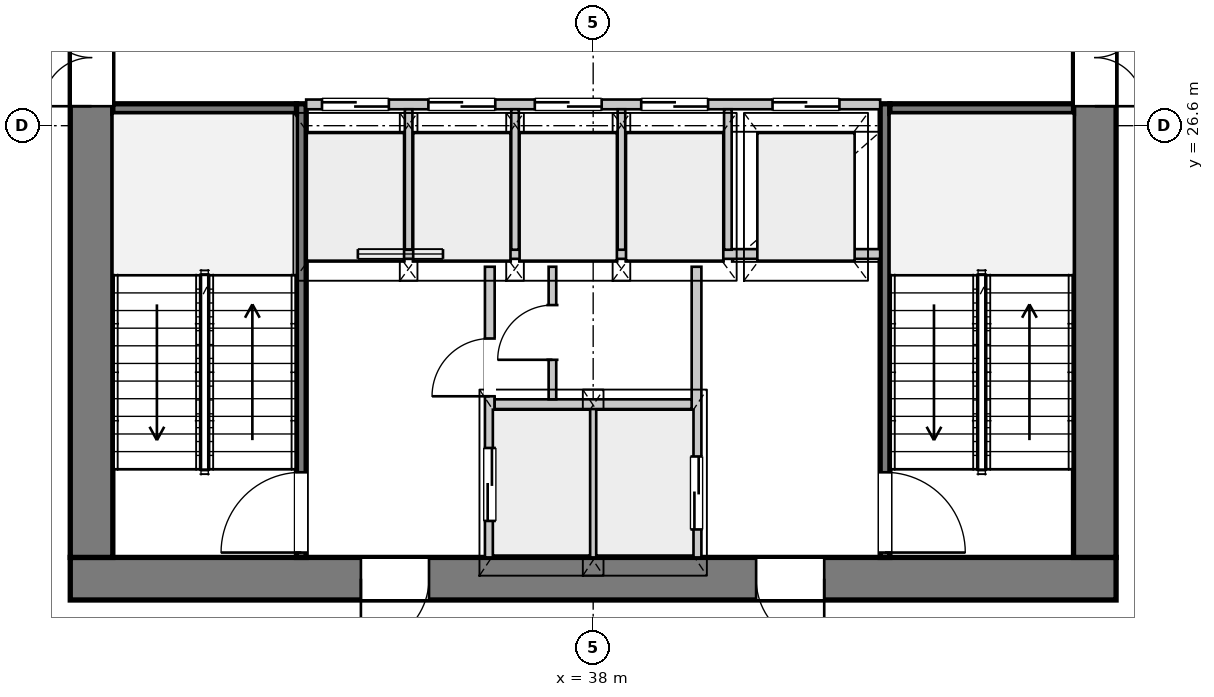
"""IFC4 building model, lengths in metres.
Left out: names, types, materials, properties, quantities, classifications, styles, units other than length and angle.
Written with IfcOpenShell. Run it as: python <this file> out.ifc"""

import sys

from ifc_helpers import new_model, si_unit, direction, frame, frame_2d, origin, place, context, subcontext, project, spatial, rectangle, extrude, source, transform, mapped, element, fill, save


model = new_model("IFC4")
c1 = context("Model", 3, precision=1e-05, world=origin(), true_north=direction((0.0, 1.0)))
c2 = subcontext(c1, "Body", "Model", "MODEL_VIEW")
j1 = project(units=[si_unit("LENGTHUNIT", "METRE"), si_unit("PLANEANGLEUNIT", "RADIAN")], contexts=[c1])
p1 = place(None, origin())
s1 = spatial("IfcSite", under=j1, at=p1, CompositionType="ELEMENT")
p2 = place(p1, origin())
s2 = spatial("IfcBuilding", under=s1, at=p2, CompositionType="ELEMENT")
p3 = place(p2, frame((0.0, 0.0, 134.1)))
s3 = spatial("IfcBuildingStorey", under=s2, at=p3, CompositionType="ELEMENT", Elevation=134.1)
p4 = place(p3, frame((46.6, 19.15, 0.0), z_axis=(0.0, 0.0, 1.0), x_axis=(-1.0, 0.0, 0.0)))
e1 = element("IfcWall", 1, at=p4, inside=s3, PredefinedType="SHEAR", context=c2, shape_type="SweptSolid", body=[
    extrude(rectangle(XDim=17.2, YDim=0.7, at=frame_2d((8.6, 0.0))), origin(), (0.0, 0.0, 1.0), 3.75),
])
p5 = place(p4, frame((4.8, 0.0, 0.0)))
e2 = element("IfcOpeningElement", 2, at=p5, cuts=e1, PredefinedType="OPENING", context=c2, shape_type="SweptSolid", body=[
    extrude(rectangle(XDim=1.12, YDim=2.25, at=frame_2d((0.56, 1.125))), frame((0.0, 0.36, 0.0), z_axis=(0.0, -1.0, 0.0), x_axis=(1.0, 0.0, 0.0)), (0.0, 0.0, 1.0), 0.72),
])
p6 = place(p4, frame((11.3, 0.0, 0.0)))
e3 = element("IfcOpeningElement", 3, at=p6, cuts=e1, PredefinedType="OPENING", context=c2, shape_type="SweptSolid", body=[
    extrude(rectangle(XDim=1.12, YDim=2.25, at=frame_2d((0.56, 1.125))), frame((0.0, 0.36, 0.0), z_axis=(0.0, -1.0, 0.0), x_axis=(1.0, 0.0, 0.0)), (0.0, 0.0, 1.0), 0.72),
])
p7 = place(p3, frame((29.75, 19.5, 0.0), z_axis=(0.0, 0.0, 1.0), x_axis=(0.0, 1.0, 0.0)))
e4 = element("IfcWall", 4, at=p7, inside=s3, PredefinedType="SHEAR", context=c2, shape_type="SweptSolid", body=[
    extrude(rectangle(XDim=14.2, YDim=0.7, at=frame_2d((7.1, 0.0))), origin(), (0.0, 0.0, 1.0), 3.75),
])
p8 = place(p7, frame((7.42, 0.0, 0.0)))
e5 = element("IfcOpeningElement", 5, at=p8, cuts=e4, PredefinedType="OPENING", context=c2, shape_type="SweptSolid", body=[
    extrude(rectangle(XDim=1.6, YDim=2.2, at=frame_2d((0.8, 1.1))), frame((0.0, 0.36, 0.0), z_axis=(0.0, -1.0, 0.0), x_axis=(1.0, 0.0, 0.0)), (0.0, 0.0, 1.0), 0.72),
])
p9 = place(p3, frame((46.25, 33.7, 0.0), z_axis=(0.0, 0.0, 1.0), x_axis=(0.0, -1.0, 0.0)))
e6 = element("IfcWall", 6, at=p9, inside=s3, PredefinedType="SHEAR", context=c2, shape_type="SweptSolid", body=[
    extrude(rectangle(XDim=14.2, YDim=0.7, at=frame_2d((7.1, 0.0))), origin(), (0.0, 0.0, 1.0), 3.75),
])
p10 = place(p9, frame((5.18, 0.0, 0.0)))
e7 = element("IfcOpeningElement", 7, at=p10, cuts=e6, PredefinedType="OPENING", context=c2, shape_type="SweptSolid", body=[
    extrude(rectangle(XDim=1.6, YDim=2.2, at=frame_2d((0.8, 1.1))), frame((0.0, 0.36, 0.0), z_axis=(0.0, -1.0, 0.0), x_axis=(1.0, 0.0, 0.0)), (0.0, 0.0, 1.0), 0.72),
])
p11 = place(p3, frame((33.2, 19.5, 0.0), z_axis=(0.0, 0.0, 1.0), x_axis=(0.0, 1.0, 0.0)))
e8 = element("IfcWall", 8, at=p11, inside=s3, PredefinedType="PARTITIONING", context=c2, shape_type="SweptSolid", body=[
    extrude(rectangle(XDim=7.46, YDim=0.16, at=frame_2d((3.73, 0.0))), origin(), (0.0, 0.0, 1.0), 3.75),
])
p12 = place(p11, frame((0.08, 0.0, 0.0)))
e9 = element("IfcOpeningElement", 9, at=p12, cuts=e8, PredefinedType="OPENING", context=c2, shape_type="SweptSolid", body=[
    extrude(rectangle(XDim=1.32, YDim=2.2, at=frame_2d((0.66, 1.1))), frame((0.0, 0.09, 0.0), z_axis=(0.0, -1.0, 0.0), x_axis=(1.0, 0.0, 0.0)), (0.0, 0.0, 1.0), 0.18),
])
p13 = place(p3, frame((30.1, 26.88, 0.0), z_axis=(0.0, 0.0, 1.0), x_axis=(1.0, 0.0, 0.0)))
e10 = element("IfcWall", 10, at=p13, inside=s3, PredefinedType="PARTITIONING", context=c2, shape_type="SweptSolid", body=[
    extrude(rectangle(XDim=3.02, YDim=0.16, at=frame_2d((1.51, 0.0))), origin(), (0.0, 0.0, 1.0), 3.75),
])
p14 = place(p3, frame((42.8, 26.96, 0.0), z_axis=(0.0, 0.0, 1.0), x_axis=(0.0, -1.0, 0.0)))
e11 = element("IfcWall", 11, at=p14, inside=s3, PredefinedType="PARTITIONING", context=c2, shape_type="SweptSolid", body=[
    extrude(rectangle(XDim=7.46, YDim=0.16, at=frame_2d((3.73, 0.0))), origin(), (0.0, 0.0, 1.0), 3.75),
])
p15 = place(p14, frame((6.06, 0.0, 0.0)))
e12 = element("IfcOpeningElement", 12, at=p15, cuts=e11, PredefinedType="OPENING", context=c2, shape_type="SweptSolid", body=[
    extrude(rectangle(XDim=1.32, YDim=2.2, at=frame_2d((0.66, 1.1))), frame((0.0, 0.09, 0.0), z_axis=(0.0, -1.0, 0.0), x_axis=(1.0, 0.0, 0.0)), (0.0, 0.0, 1.0), 0.18),
])
p16 = place(p3, frame((42.88, 26.88, 0.0), z_axis=(0.0, 0.0, 1.0), x_axis=(1.0, 0.0, 0.0)))
e13 = element("IfcWall", 13, at=p16, inside=s3, PredefinedType="PARTITIONING", context=c2, shape_type="SweptSolid", body=[
    extrude(rectangle(XDim=3.02, YDim=0.16, at=frame_2d((1.51, 0.0))), origin(), (0.0, 0.0, 1.0), 3.75),
])
p17 = place(p3, frame((36.3, 19.5, 0.0), z_axis=(0.0, 0.0, 1.0), x_axis=(0.0, 1.0, 0.0)))
e14 = element("IfcWall", 14, at=p17, inside=s3, PredefinedType="PARTITIONING", context=c2, shape_type="SweptSolid", body=[
    extrude(rectangle(XDim=4.78, YDim=0.16, at=frame_2d((2.39, 0.0))), origin(), (0.0, 0.0, 1.0), 3.75),
])
p18 = place(p17, frame((0.6, 0.0, 0.0)))
e15 = element("IfcOpeningElement", 15, at=p18, cuts=e14, PredefinedType="OPENING", context=c2, shape_type="SweptSolid", body=[
    extrude(rectangle(XDim=1.2, YDim=2.2, at=frame_2d((0.6, 1.1))), frame((0.0, 0.09, 0.0), z_axis=(0.0, -1.0, 0.0), x_axis=(1.0, 0.0, 0.0)), (0.0, 0.0, 1.0), 0.18),
])
p19 = place(p17, frame((2.65, 0.0, 0.0)))
e16 = element("IfcOpeningElement", 16, at=p19, cuts=e14, PredefinedType="OPENING", context=c2, shape_type="SweptSolid", body=[
    extrude(rectangle(XDim=0.95, YDim=2.1, at=frame_2d((0.475, 1.05))), frame((0.0, 0.09, 0.0), z_axis=(0.0, -1.0, 0.0), x_axis=(1.0, 0.0, 0.0)), (0.0, 0.0, 1.0), 0.18),
])
p20 = place(p3, frame((39.7, 24.28, 0.0), z_axis=(0.0, 0.0, 1.0), x_axis=(0.0, -1.0, 0.0)))
e17 = element("IfcWall", 17, at=p20, inside=s3, PredefinedType="PARTITIONING", context=c2, shape_type="SweptSolid", body=[
    extrude(rectangle(XDim=4.78, YDim=0.16, at=frame_2d((2.39, 0.0))), origin(), (0.0, 0.0, 1.0), 3.75),
])
p21 = place(p20, frame((3.12, 0.0, 0.0)))
e18 = element("IfcOpeningElement", 18, at=p21, cuts=e17, PredefinedType="OPENING", context=c2, shape_type="SweptSolid", body=[
    extrude(rectangle(XDim=1.2, YDim=2.2, at=frame_2d((0.6, 1.1))), frame((0.0, 0.09, 0.0), z_axis=(0.0, -1.0, 0.0), x_axis=(1.0, 0.0, 0.0)), (0.0, 0.0, 1.0), 0.18),
])
p22 = place(p3, frame((38.0, 19.5, 0.0), z_axis=(0.0, 0.0, 1.0), x_axis=(0.0, 1.0, 0.0)))
e19 = element("IfcWall", 19, at=p22, inside=s3, PredefinedType="PARTITIONING", context=c2, shape_type="SweptSolid", body=[
    extrude(rectangle(XDim=2.46, YDim=0.125, at=frame_2d((1.23, 0.0))), origin(), (0.0, 0.0, 1.0), 3.75),
])
p23 = place(p3, frame((36.38, 22.02, 0.0), z_axis=(0.0, 0.0, 1.0), x_axis=(1.0, 0.0, 0.0)))
e20 = element("IfcWall", 20, at=p23, inside=s3, PredefinedType="PARTITIONING", context=c2, shape_type="SweptSolid", body=[
    extrude(rectangle(XDim=3.24, YDim=0.16, at=frame_2d((1.62, 0.0))), origin(), (0.0, 0.0, 1.0), 3.75),
])
p24 = place(p3, frame((33.28, 24.49, 0.0), z_axis=(0.0, 0.0, 1.0), x_axis=(1.0, 0.0, 0.0)))
e21 = element("IfcWall", 21, at=p24, inside=s3, PredefinedType="PARTITIONING", context=c2, shape_type="SweptSolid", body=[
    extrude(rectangle(XDim=9.44, YDim=0.16, at=frame_2d((4.72, 0.0))), origin(), (0.0, 0.0, 1.0), 3.75),
])
p25 = place(p24, frame((0.85, 0.0, 0.95)))
e22 = element("IfcOpeningElement", 22, at=p25, cuts=e21, PredefinedType="OPENING", context=c2, shape_type="SweptSolid", body=[
    extrude(rectangle(XDim=1.4, YDim=1.8, at=frame_2d((0.7, 0.9))), frame((0.0, 0.09, 0.0), z_axis=(0.0, -1.0, 0.0), x_axis=(1.0, 0.0, 0.0)), (0.0, 0.0, 1.0), 0.18),
])
p26 = place(p3, frame((37.33, 22.1, 0.0), z_axis=(0.0, 0.0, 1.0), x_axis=(0.0, 1.0, 0.0)))
e23 = element("IfcWall", 23, at=p26, inside=s3, PredefinedType="PARTITIONING", context=c2, shape_type="SweptSolid", body=[
    extrude(rectangle(XDim=2.18, YDim=0.125, at=frame_2d((1.09, 0.0))), origin(), (0.0, 0.0, 1.0), 3.75),
])
p27 = place(p26, frame((0.65, 0.0, 0.0)))
e24 = element("IfcOpeningElement", 24, at=p27, cuts=e23, PredefinedType="OPENING", context=c2, shape_type="SweptSolid", body=[
    extrude(rectangle(XDim=0.9, YDim=2.1, at=frame_2d((0.45, 1.05))), frame((0.0, 0.073, 0.0), z_axis=(0.0, -1.0, 0.0), x_axis=(1.0, 0.0, 0.0)), (0.0, 0.0, 1.0), 0.145),
])
p28 = place(p3, frame((33.28, 26.95, 0.0), z_axis=(0.0, 0.0, 1.0), x_axis=(1.0, 0.0, 0.0)))
e25 = element("IfcWall", 25, at=p28, inside=s3, PredefinedType="PARTITIONING", context=c2, shape_type="SweptSolid", body=[
    extrude(rectangle(XDim=9.44, YDim=0.16, at=frame_2d((4.72, 0.0))), origin(), (0.0, 0.0, 1.0), 3.75),
])
p29 = place(p28, frame((0.26, 0.0, 0.0)))
e26 = element("IfcOpeningElement", 26, at=p29, cuts=e25, PredefinedType="OPENING", context=c2, shape_type="SweptSolid", body=[
    extrude(rectangle(XDim=1.1, YDim=2.2, at=frame_2d((0.55, 1.1))), frame((0.0, 0.09, 0.0), z_axis=(0.0, -1.0, 0.0), x_axis=(1.0, 0.0, 0.0)), (0.0, 0.0, 1.0), 0.18),
])
p30 = place(p28, frame((2.01, 0.0, 0.0)))
e27 = element("IfcOpeningElement", 27, at=p30, cuts=e25, PredefinedType="OPENING", context=c2, shape_type="SweptSolid", body=[
    extrude(rectangle(XDim=1.1, YDim=2.2, at=frame_2d((0.55, 1.1))), frame((0.0, 0.09, 0.0), z_axis=(0.0, -1.0, 0.0), x_axis=(1.0, 0.0, 0.0)), (0.0, 0.0, 1.0), 0.18),
])
p31 = place(p28, frame((3.76, 0.0, 0.0)))
e28 = element("IfcOpeningElement", 28, at=p31, cuts=e25, PredefinedType="OPENING", context=c2, shape_type="SweptSolid", body=[
    extrude(rectangle(XDim=1.1, YDim=2.2, at=frame_2d((0.55, 1.1))), frame((0.0, 0.09, 0.0), z_axis=(0.0, -1.0, 0.0), x_axis=(1.0, 0.0, 0.0)), (0.0, 0.0, 1.0), 0.18),
])
p32 = place(p28, frame((5.51, 0.0, 0.0)))
e29 = element("IfcOpeningElement", 29, at=p32, cuts=e25, PredefinedType="OPENING", context=c2, shape_type="SweptSolid", body=[
    extrude(rectangle(XDim=1.1, YDim=2.2, at=frame_2d((0.55, 1.1))), frame((0.0, 0.09, 0.0), z_axis=(0.0, -1.0, 0.0), x_axis=(1.0, 0.0, 0.0)), (0.0, 0.0, 1.0), 0.18),
])
p33 = place(p28, frame((7.67, 0.0, 0.0)))
e30 = element("IfcOpeningElement", 30, at=p33, cuts=e25, PredefinedType="OPENING", context=c2, shape_type="SweptSolid", body=[
    extrude(rectangle(XDim=1.1, YDim=2.2, at=frame_2d((0.55, 1.1))), frame((0.0, 0.09, 0.0), z_axis=(0.0, -1.0, 0.0), x_axis=(1.0, 0.0, 0.0)), (0.0, 0.0, 1.0), 0.18),
])
for number, where, z_axis, x_axis in (
    (31, (34.965, 24.56, 0.0), (0.0, 0.0, 1.0), (0.0, 1.0, 0.0)),
    (32, (36.715, 24.56, 0.0), (0.0, 0.0, 1.0), (0.0, 1.0, 0.0)),
    (33, (38.465, 24.56, 0.0), (0.0, 0.0, 1.0), (0.0, 1.0, 0.0)),
    (34, (40.215, 24.56, 0.0), (0.0, 0.0, 1.0), (0.0, 1.0, 0.0)),
):
    element("IfcWall", number, at=place(p3, frame(where, z_axis=z_axis, x_axis=x_axis)), inside=s3, PredefinedType="PARTITIONING", context=c2, shape_type="SweptSolid", body=[
        extrude(rectangle(XDim=2.31, YDim=0.125, at=frame_2d((1.155, 0.0))), origin(), (0.0, 0.0, 1.0), 3.75),
    ])
m1 = source(origin(), c2, "Body", "SweptSolid", [
    extrude(rectangle(XDim=1.12, YDim=2.25, at=frame_2d((0.56, 1.125))), frame((0.0, 0.025, 0.0), z_axis=(0.0, -1.0, 0.0), x_axis=(1.0, 0.0, 0.0)), (0.0, 0.0, 1.0), 0.05),
])
p34 = place(p5, origin())
e35 = element("IfcDoor", 35, at=p34, inside=s3, OperationType="SINGLE_SWING_LEFT", PredefinedType="DOOR", context=c2, shape_type="MappedRepresentation", body=[
    mapped(m1, transform((0.0, 0.0, 0.0), x_axis=(1.0, 0.0, 0.0), y_axis=(0.0, 1.0, 0.0), z_axis=(0.0, 0.0, 1.0), scale=1.0)),
])
fill(e2, e35)
p35 = place(p6, origin())
e36 = element("IfcDoor", 36, at=p35, inside=s3, OperationType="SINGLE_SWING_RIGHT", PredefinedType="DOOR", context=c2, shape_type="MappedRepresentation", body=[
    mapped(m1, transform((0.0, 0.0, 0.0), x_axis=(1.0, 0.0, 0.0), y_axis=(0.0, 1.0, 0.0), z_axis=(0.0, 0.0, 1.0), scale=1.0)),
])
fill(e3, e36)
m2 = source(origin(), c2, "Body", "SweptSolid", [
    extrude(rectangle(XDim=1.6, YDim=2.2, at=frame_2d((0.8, 1.1))), frame((0.0, 0.025, 0.0), z_axis=(0.0, -1.0, 0.0), x_axis=(1.0, 0.0, 0.0)), (0.0, 0.0, 1.0), 0.05),
])
p36 = place(p8, origin())
e37 = element("IfcDoor", 37, at=p36, inside=s3, OperationType="DOUBLE_DOOR_SINGLE_SWING", PredefinedType="DOOR", context=c2, shape_type="MappedRepresentation", body=[
    mapped(m2, transform((0.0, 0.0, 0.0), x_axis=(1.0, 0.0, 0.0), y_axis=(0.0, 1.0, 0.0), z_axis=(0.0, 0.0, 1.0), scale=1.0)),
])
fill(e5, e37)
p37 = place(p10, origin())
e38 = element("IfcDoor", 38, at=p37, inside=s3, OperationType="DOUBLE_DOOR_SINGLE_SWING", PredefinedType="DOOR", context=c2, shape_type="MappedRepresentation", body=[
    mapped(m2, transform((0.0, 0.0, 0.0), x_axis=(1.0, 0.0, 0.0), y_axis=(0.0, 1.0, 0.0), z_axis=(0.0, 0.0, 1.0), scale=1.0)),
])
fill(e7, e38)
m3 = source(origin(), c2, "Body", "SweptSolid", [
    extrude(rectangle(XDim=1.32, YDim=2.2, at=frame_2d((0.66, 1.1))), frame((0.0, 0.025, 0.0), z_axis=(0.0, -1.0, 0.0), x_axis=(1.0, 0.0, 0.0)), (0.0, 0.0, 1.0), 0.05),
])
p38 = place(p12, origin())
e39 = element("IfcDoor", 39, at=p38, inside=s3, OperationType="SINGLE_SWING_LEFT", PredefinedType="DOOR", context=c2, shape_type="MappedRepresentation", body=[
    mapped(m3, transform((0.0, 0.0, 0.0), x_axis=(1.0, 0.0, 0.0), y_axis=(0.0, 1.0, 0.0), z_axis=(0.0, 0.0, 1.0), scale=1.0)),
])
fill(e9, e39)
p39 = place(p15, origin())
e40 = element("IfcDoor", 40, at=p39, inside=s3, OperationType="SINGLE_SWING_RIGHT", PredefinedType="DOOR", context=c2, shape_type="MappedRepresentation", body=[
    mapped(m3, transform((0.0, 0.0, 0.0), x_axis=(1.0, 0.0, 0.0), y_axis=(0.0, 1.0, 0.0), z_axis=(0.0, 0.0, 1.0), scale=1.0)),
])
fill(e12, e40)
m4 = source(origin(), c2, "Body", "SweptSolid", [
    extrude(rectangle(XDim=1.2, YDim=2.2, at=frame_2d((0.6, 1.1))), frame((0.0, 0.025, 0.0), z_axis=(0.0, -1.0, 0.0), x_axis=(1.0, 0.0, 0.0)), (0.0, 0.0, 1.0), 0.05),
])
p40 = place(p18, origin())
e41 = element("IfcDoor", 41, at=p40, inside=s3, OperationType="DOUBLE_DOOR_SLIDING", PredefinedType="DOOR", context=c2, shape_type="MappedRepresentation", body=[
    mapped(m4, transform((0.0, 0.0, 0.0), x_axis=(1.0, 0.0, 0.0), y_axis=(0.0, 1.0, 0.0), z_axis=(0.0, 0.0, 1.0), scale=1.0)),
])
fill(e15, e41)
m5 = source(origin(), c2, "Body", "SweptSolid", [
    extrude(rectangle(XDim=0.95, YDim=2.1, at=frame_2d((0.475, 1.05))), frame((0.0, 0.025, 0.0), z_axis=(0.0, -1.0, 0.0), x_axis=(1.0, 0.0, 0.0)), (0.0, 0.0, 1.0), 0.05),
])
p41 = place(p19, origin())
e42 = element("IfcDoor", 42, at=p41, inside=s3, OperationType="SINGLE_SWING_LEFT", PredefinedType="DOOR", context=c2, shape_type="MappedRepresentation", body=[
    mapped(m5, transform((0.0, 0.0, 0.0), x_axis=(1.0, 0.0, 0.0), y_axis=(0.0, 1.0, 0.0), z_axis=(0.0, 0.0, 1.0), scale=1.0)),
])
fill(e16, e42)
m6 = source(origin(), c2, "Body", "SweptSolid", [
    extrude(rectangle(XDim=0.9, YDim=2.1, at=frame_2d((0.45, 1.05))), frame((0.0, 0.025, 0.0), z_axis=(0.0, -1.0, 0.0), x_axis=(1.0, 0.0, 0.0)), (0.0, 0.0, 1.0), 0.05),
])
p42 = place(p27, origin())
e43 = element("IfcDoor", 43, at=p42, inside=s3, OperationType="SINGLE_SWING_LEFT", PredefinedType="DOOR", context=c2, shape_type="MappedRepresentation", body=[
    mapped(m6, transform((0.0, 0.0, 0.0), x_axis=(1.0, 0.0, 0.0), y_axis=(0.0, 1.0, 0.0), z_axis=(0.0, 0.0, 1.0), scale=1.0)),
])
fill(e24, e43)
p43 = place(p21, origin())
e44 = element("IfcDoor", 44, at=p43, inside=s3, OperationType="DOUBLE_DOOR_SLIDING", PredefinedType="DOOR", context=c2, shape_type="MappedRepresentation", body=[
    mapped(m4, transform((0.0, 0.0, 0.0), x_axis=(1.0, 0.0, 0.0), y_axis=(0.0, 1.0, 0.0), z_axis=(0.0, 0.0, 1.0), scale=1.0)),
])
fill(e18, e44)
m7 = source(origin(), c2, "Body", "SweptSolid", [
    extrude(rectangle(XDim=1.1, YDim=2.2, at=frame_2d((0.55, 1.1))), frame((0.0, 0.025, 0.0), z_axis=(0.0, -1.0, 0.0), x_axis=(1.0, 0.0, 0.0)), (0.0, 0.0, 1.0), 0.05),
])
p44 = place(p29, origin())
e45 = element("IfcDoor", 45, at=p44, inside=s3, OperationType="DOUBLE_DOOR_SLIDING", PredefinedType="DOOR", context=c2, shape_type="MappedRepresentation", body=[
    mapped(m7, transform((0.0, 0.0, 0.0), x_axis=(1.0, 0.0, 0.0), y_axis=(0.0, 1.0, 0.0), z_axis=(0.0, 0.0, 1.0), scale=1.0)),
])
fill(e26, e45)
p45 = place(p30, origin())
e46 = element("IfcDoor", 46, at=p45, inside=s3, OperationType="DOUBLE_DOOR_SLIDING", PredefinedType="DOOR", context=c2, shape_type="MappedRepresentation", body=[
    mapped(m7, transform((0.0, 0.0, 0.0), x_axis=(1.0, 0.0, 0.0), y_axis=(0.0, 1.0, 0.0), z_axis=(0.0, 0.0, 1.0), scale=1.0)),
])
fill(e27, e46)
p46 = place(p31, origin())
e47 = element("IfcDoor", 47, at=p46, inside=s3, OperationType="DOUBLE_DOOR_SLIDING", PredefinedType="DOOR", context=c2, shape_type="MappedRepresentation", body=[
    mapped(m7, transform((0.0, 0.0, 0.0), x_axis=(1.0, 0.0, 0.0), y_axis=(0.0, 1.0, 0.0), z_axis=(0.0, 0.0, 1.0), scale=1.0)),
])
fill(e28, e47)
p47 = place(p32, origin())
e48 = element("IfcDoor", 48, at=p47, inside=s3, OperationType="DOUBLE_DOOR_SLIDING", PredefinedType="DOOR", context=c2, shape_type="MappedRepresentation", body=[
    mapped(m7, transform((0.0, 0.0, 0.0), x_axis=(1.0, 0.0, 0.0), y_axis=(0.0, 1.0, 0.0), z_axis=(0.0, 0.0, 1.0), scale=1.0)),
])
fill(e29, e48)
p48 = place(p33, origin())
e49 = element("IfcDoor", 49, at=p48, inside=s3, OperationType="DOUBLE_DOOR_SLIDING", PredefinedType="DOOR", context=c2, shape_type="MappedRepresentation", body=[
    mapped(m7, transform((0.0, 0.0, 0.0), x_axis=(1.0, 0.0, 0.0), y_axis=(0.0, 1.0, 0.0), z_axis=(0.0, 0.0, 1.0), scale=1.0)),
])
fill(e30, e49)
m8 = source(origin(), c2, "Body", "SweptSolid", [
    extrude(rectangle(XDim=1.4, YDim=1.8, at=frame_2d((0.7, 0.9))), frame((0.0, 0.03, 0.0), z_axis=(0.0, -1.0, 0.0), x_axis=(1.0, 0.0, 0.0)), (0.0, 0.0, 1.0), 0.06),
])
p49 = place(p25, origin())
e50 = element("IfcWindow", 50, at=p49, inside=s3, PartitioningType="SINGLE_PANEL", PredefinedType="WINDOW", context=c2, shape_type="MappedRepresentation", body=[
    mapped(m8, transform((0.0, 0.0, 0.0), x_axis=(1.0, 0.0, 0.0), y_axis=(0.0, 1.0, 0.0), z_axis=(0.0, 0.0, 1.0), scale=1.0)),
])
fill(e22, e50)
save(model, sys.argv[1])
